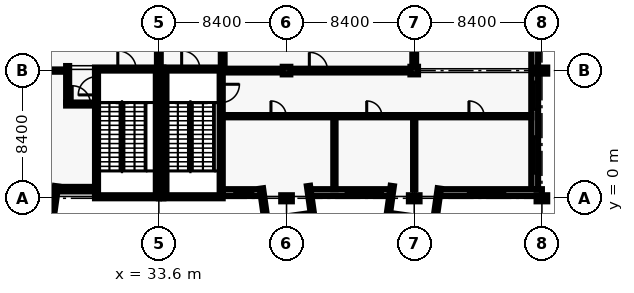
"""IFC4 building model, lengths in metres.
Left out: names, types, materials, properties, quantities, classifications, styles, units other than length and angle.
Written with IfcOpenShell. Run it as: python <this file> out.ifc"""

import sys

from ifc_helpers import new_model, si_unit, direction, frame, frame_2d, origin, origin_2d, place, context, subcontext, project, spatial, rectangle, extrude, element, fill, save


model = new_model("IFC4")
c1 = context("Model", 3, precision=1e-05, world=origin(), true_north=direction((0.0, 1.0)))
c2 = subcontext(c1, "Body", "Model", "MODEL_VIEW")
j1 = project(units=[si_unit("LENGTHUNIT", "METRE"), si_unit("PLANEANGLEUNIT", "RADIAN")], contexts=[c1])
p1 = place(None, origin())
s1 = spatial("IfcSite", under=j1, at=p1, CompositionType="ELEMENT")
p2 = place(p1, origin())
s2 = spatial("IfcBuilding", under=s1, at=p2, CompositionType="ELEMENT")
p3 = place(p2, frame((0.0, 0.0, 10.2)))
s3 = spatial("IfcBuildingStorey", under=s2, at=p3, CompositionType="ELEMENT", Elevation=10.2)
p4 = place(p3, frame((33.6, 0.1, 0.0), z_axis=(0.0, 0.0, 1.0), x_axis=(-1.0, 0.0, 0.0)))
e1 = element("IfcWall", 1, at=p4, inside=s3, PredefinedType="SHEAR", context=c2, shape_type="SweptSolid", body=[
    extrude(rectangle(XDim=4.2, YDim=0.2, at=frame_2d((2.1, 0.0))), origin(), (0.0, 0.0, 1.0), 4.8),
])
p5 = place(p3, frame((29.4, 8.5, 0.0), z_axis=(0.0, 0.0, 1.0), x_axis=(1.0, 0.0, 0.0)))
e2 = element("IfcWall", 2, at=p5, inside=s3, PredefinedType="SHEAR", context=c2, shape_type="SweptSolid", body=[
    extrude(rectangle(XDim=4.2, YDim=0.2, at=frame_2d((2.1, 0.0))), origin(), (0.0, 0.0, 1.0), 4.8),
])
p6 = place(p5, frame((1.5, 0.0, 0.0)))
e3 = element("IfcOpeningElement", 3, at=p6, cuts=e2, PredefinedType="OPENING", context=c2, shape_type="SweptSolid", body=[
    extrude(rectangle(XDim=1.2, YDim=2.1, at=frame_2d((0.6, 1.05))), frame((0.0, 0.11, 0.0), z_axis=(0.0, -1.0, 0.0), x_axis=(1.0, 0.0, 0.0)), (0.0, 0.0, 1.0), 0.22),
])
p7 = place(p3, frame((29.5, 0.2, 0.0), z_axis=(0.0, 0.0, 1.0), x_axis=(0.0, 1.0, 0.0)))
e4 = element("IfcWall", 4, at=p7, inside=s3, PredefinedType="SHEAR", context=c2, shape_type="SweptSolid", body=[
    extrude(rectangle(XDim=8.2, YDim=0.2, at=frame_2d((4.1, 0.0))), origin(), (0.0, 0.0, 1.0), 4.8),
])
p8 = place(p7, frame((6.6, 0.0, 0.0)))
e5 = element("IfcOpeningElement", 5, at=p8, cuts=e4, PredefinedType="OPENING", context=c2, shape_type="SweptSolid", body=[
    extrude(rectangle(XDim=1.2, YDim=2.1, at=frame_2d((0.6, 1.05))), frame((0.0, 0.11, 0.0), z_axis=(0.0, -1.0, 0.0), x_axis=(1.0, 0.0, 0.0)), (0.0, 0.0, 1.0), 0.22),
])
p9 = place(p3, frame((33.5, 8.4, 0.0), z_axis=(0.0, 0.0, 1.0), x_axis=(0.0, -1.0, 0.0)))
e6 = element("IfcWall", 6, at=p9, inside=s3, PredefinedType="SHEAR", context=c2, shape_type="SweptSolid", body=[
    extrude(rectangle(XDim=8.2, YDim=0.2, at=frame_2d((4.1, 0.0))), origin(), (0.0, 0.0, 1.0), 4.8),
])
p10 = place(p3, frame((37.8, 0.1, 0.0), z_axis=(0.0, 0.0, 1.0), x_axis=(-1.0, 0.0, 0.0)))
e7 = element("IfcWall", 7, at=p10, inside=s3, PredefinedType="SHEAR", context=c2, shape_type="SweptSolid", body=[
    extrude(rectangle(XDim=3.9, YDim=0.2, at=frame_2d((1.95, 0.0))), origin(), (0.0, 0.0, 1.0), 4.8),
])
p11 = place(p3, frame((33.9, 8.5, 0.0), z_axis=(0.0, 0.0, 1.0), x_axis=(1.0, 0.0, 0.0)))
e8 = element("IfcWall", 8, at=p11, inside=s3, PredefinedType="SHEAR", context=c2, shape_type="SweptSolid", body=[
    extrude(rectangle(XDim=3.9, YDim=0.2, at=frame_2d((1.95, 0.0))), origin(), (0.0, 0.0, 1.0), 4.8),
])
p12 = place(p11, frame((1.2, 0.0, 0.0)))
e9 = element("IfcOpeningElement", 9, at=p12, cuts=e8, PredefinedType="OPENING", context=c2, shape_type="SweptSolid", body=[
    extrude(rectangle(XDim=1.2, YDim=2.1, at=frame_2d((0.6, 1.05))), frame((0.0, 0.11, 0.0), z_axis=(0.0, -1.0, 0.0), x_axis=(1.0, 0.0, 0.0)), (0.0, 0.0, 1.0), 0.22),
])
p13 = place(p3, frame((34.0, 0.2, 0.0), z_axis=(0.0, 0.0, 1.0), x_axis=(0.0, 1.0, 0.0)))
e10 = element("IfcWall", 10, at=p13, inside=s3, PredefinedType="SHEAR", context=c2, shape_type="SweptSolid", body=[
    extrude(rectangle(XDim=8.2, YDim=0.2, at=frame_2d((4.1, 0.0))), origin(), (0.0, 0.0, 1.0), 4.8),
])
p14 = place(p3, frame((37.7, 8.4, 0.0), z_axis=(0.0, 0.0, 1.0), x_axis=(0.0, -1.0, 0.0)))
e11 = element("IfcWall", 11, at=p14, inside=s3, PredefinedType="SHEAR", context=c2, shape_type="SweptSolid", body=[
    extrude(rectangle(XDim=8.2, YDim=0.2, at=frame_2d((4.1, 0.0))), origin(), (0.0, 0.0, 1.0), 4.8),
])
p15 = place(p14, frame((0.9, 0.0, 0.0)))
e12 = element("IfcOpeningElement", 12, at=p15, cuts=e11, PredefinedType="OPENING", context=c2, shape_type="SweptSolid", body=[
    extrude(rectangle(XDim=1.2, YDim=2.1, at=frame_2d((0.6, 1.05))), frame((0.0, 0.11, 0.0), z_axis=(0.0, -1.0, 0.0), x_axis=(1.0, 0.0, 0.0)), (0.0, 0.0, 1.0), 0.22),
])
p16 = place(p3, frame((42.0, 0.0, 0.0), z_axis=(0.0, 0.0, 1.0), x_axis=(1.0, 0.0, 0.0)))
e13 = element("IfcColumn", 13, at=p16, inside=s3, PredefinedType="COLUMN", context=c2, shape_type="SweptSolid", body=[
    extrude(rectangle(XDim=0.7, YDim=0.4, at=origin_2d()), origin(), (0.0, 0.0, 1.0), 4.8),
])
p17 = place(p3, frame((42.0, 8.4, 0.0), z_axis=(0.0, 0.0, 1.0), x_axis=(1.0, 0.0, 0.0)))
e14 = element("IfcColumn", 14, at=p17, inside=s3, PredefinedType="COLUMN", context=c2, shape_type="SweptSolid", body=[
    extrude(rectangle(XDim=0.5, YDim=0.5, at=origin_2d()), origin(), (0.0, 0.0, 1.0), 4.8),
])
p18 = place(p3, frame((50.4, 0.0, 0.0), z_axis=(0.0, 0.0, 1.0), x_axis=(1.0, 0.0, 0.0)))
e15 = element("IfcColumn", 15, at=p18, inside=s3, PredefinedType="COLUMN", context=c2, shape_type="SweptSolid", body=[
    extrude(rectangle(XDim=0.7, YDim=0.4, at=origin_2d()), origin(), (0.0, 0.0, 1.0), 4.8),
])
p19 = place(p3, frame((50.4, 8.4, 0.0), z_axis=(0.0, 0.0, 1.0), x_axis=(1.0, 0.0, 0.0)))
e16 = element("IfcColumn", 16, at=p19, inside=s3, PredefinedType="COLUMN", context=c2, shape_type="SweptSolid", body=[
    extrude(rectangle(XDim=0.5, YDim=0.5, at=origin_2d()), origin(), (0.0, 0.0, 1.0), 4.8),
])
for number, where, z_axis, x_axis in (
    (17, (58.8, 0.0, 0.0), (0.0, 0.0, 1.0), (1.0, 0.0, 0.0)),
    (18, (58.8, 8.4, 0.0), (0.0, 0.0, 1.0), (0.0, 1.0, 0.0)),
):
    element("IfcColumn", number, at=place(p3, frame(where, z_axis=z_axis, x_axis=x_axis)), inside=s3, PredefinedType="COLUMN", context=c2, shape_type="SweptSolid", body=[
        extrude(rectangle(XDim=0.7, YDim=0.4, at=origin_2d()), origin(), (0.0, 0.0, 1.0), 4.8),
    ])
for number, where, z_axis, x_axis in (
    (19, (33.9, 0.1, 0.0), (0.0, 0.0, 1.0), (-1.0, 0.0, 0.0)),
    (20, (33.6, 8.5, 0.0), (0.0, 0.0, 1.0), (1.0, 0.0, 0.0)),
):
    element("IfcWall", number, at=place(p3, frame(where, z_axis=z_axis, x_axis=x_axis)), inside=s3, PredefinedType="SHEAR", context=c2, shape_type="SweptSolid", body=[
        extrude(rectangle(XDim=0.3, YDim=0.2, at=frame_2d((0.15, 0.0))), origin(), (0.0, 0.0, 1.0), 4.8),
    ])
p20 = place(p3, frame((26.869, 0.795, 0.0), z_axis=(0.0, 0.0, 1.0), x_axis=(-0.139141913905, -0.990272451295, 0.0)))
e21 = element("IfcWall", 21, at=p20, inside=s3, PredefinedType="SOLIDWALL", context=c2, shape_type="SweptSolid", body=[
    extrude(rectangle(XDim=2.219, YDim=0.215, at=frame_2d((1.11, 0.0))), origin(), (0.0, 0.0, 1.0), 4.5),
])
p21 = place(p3, frame((29.4, 0.6, 0.0), z_axis=(0.0, 0.0, 1.0), x_axis=(-1.0, 0.0, 0.0)))
e22 = element("IfcWall", 22, at=p21, inside=s3, PredefinedType="SOLIDWALL", context=c2, shape_type="SweptSolid", body=[
    extrude(rectangle(XDim=2.449, YDim=0.3, at=frame_2d((1.225, 0.0))), origin(), (0.0, 0.0, 1.0), 4.5),
])
p22 = place(p21, frame((0.775, 0.0, 0.9)))
e23 = element("IfcOpeningElement", 23, at=p22, cuts=e22, PredefinedType="OPENING", context=c2, shape_type="SweptSolid", body=[
    extrude(rectangle(XDim=1.2, YDim=1.5, at=frame_2d((0.6, 0.75))), frame((0.0, 0.16, 0.0), z_axis=(0.0, -1.0, 0.0), x_axis=(1.0, 0.0, 0.0)), (0.0, 0.0, 1.0), 0.32),
])
p23 = place(p3, frame((58.325, 15.6, 0.0), z_axis=(0.0, 0.0, 1.0), x_axis=(0.0, -1.0, 0.0)))
e24 = element("IfcWall", 24, at=p23, inside=s3, PredefinedType="SOLIDWALL", context=c2, shape_type="SweptSolid", body=[
    extrude(rectangle(XDim=15.0, YDim=0.45, at=frame_2d((7.5, 0.0))), origin(), (0.0, 0.0, 1.0), 4.5),
])
p24 = place(p23, frame((11.55, 0.0, 0.9)))
e25 = element("IfcOpeningElement", 25, at=p24, cuts=e24, PredefinedType="OPENING", context=c2, shape_type="SweptSolid", body=[
    extrude(rectangle(XDim=2.4, YDim=1.5, at=frame_2d((1.2, 0.75))), frame((0.0, 0.235, 0.0), z_axis=(0.0, -1.0, 0.0), x_axis=(1.0, 0.0, 0.0)), (0.0, 0.0, 1.0), 0.47),
])
p25 = place(p23, frame((7.95, 0.0, 0.9)))
e26 = element("IfcOpeningElement", 26, at=p25, cuts=e24, PredefinedType="OPENING", context=c2, shape_type="SweptSolid", body=[
    extrude(rectangle(XDim=1.8, YDim=1.5, at=frame_2d((0.9, 0.75))), frame((0.0, 0.235, 0.0), z_axis=(0.0, -1.0, 0.0), x_axis=(1.0, 0.0, 0.0)), (0.0, 0.0, 1.0), 0.47),
])
p26 = place(p23, frame((2.25, 0.0, 0.9)))
e27 = element("IfcOpeningElement", 27, at=p26, cuts=e24, PredefinedType="OPENING", context=c2, shape_type="SweptSolid", body=[
    extrude(rectangle(XDim=2.4, YDim=1.5, at=frame_2d((1.2, 0.75))), frame((0.0, 0.235, 0.0), z_axis=(0.0, -1.0, 0.0), x_axis=(1.0, 0.0, 0.0)), (0.0, 0.0, 1.0), 0.47),
])
p27 = place(p3, frame((40.352, 0.645, 0.0), z_axis=(0.0, 0.0, 1.0), x_axis=(0.139057680951, -0.990284283107, 0.0)))
e28 = element("IfcWall", 28, at=p27, inside=s3, PredefinedType="SOLIDWALL", context=c2, shape_type="SweptSolid", body=[
    extrude(rectangle(XDim=2.068, YDim=0.215, at=frame_2d((1.034, 0.0))), origin(), (0.0, 0.0, 1.0), 4.5),
])
for number, where, z_axis, x_axis in (
    (29, (43.444, 0.809, 0.0), (0.0, 0.0, 1.0), (0.139, -0.99, 0.0)),
    (30, (48.956, 0.809, 0.0), (0.0, 0.0, 1.0), (-0.139, -0.99, 0.0)),
):
    element("IfcWall", number, at=place(p3, frame(where, z_axis=z_axis, x_axis=x_axis)), inside=s3, PredefinedType="SOLIDWALL", context=c2, shape_type="SweptSolid", body=[
        extrude(rectangle(XDim=1.8, YDim=0.215, at=frame_2d((0.9, 0.0))), origin(), (0.0, 0.0, 1.0), 4.5),
    ])
p28 = place(p3, frame((52.048, 0.645, 0.0), z_axis=(0.0, 0.0, 1.0), x_axis=(-0.139173441018, -0.990268020949, 0.0)))
e31 = element("IfcWall", 31, at=p28, inside=s3, PredefinedType="SOLIDWALL", context=c2, shape_type="SweptSolid", body=[
    extrude(rectangle(XDim=2.068, YDim=0.215, at=frame_2d((1.034, 0.0))), origin(), (0.0, 0.0, 1.0), 4.5),
])
p29 = place(p3, frame((40.281, 0.375, 0.0), z_axis=(0.0, 0.0, 1.0), x_axis=(-1.0, 0.0, 0.0)))
e32 = element("IfcWall", 32, at=p29, inside=s3, PredefinedType="SOLIDWALL", context=c2, shape_type="SweptSolid", body=[
    extrude(rectangle(XDim=2.481, YDim=0.45, at=frame_2d((1.24, 0.0))), origin(), (0.0, 0.0, 1.0), 4.5),
])
p30 = place(p29, frame((0.49, 0.0, 0.9)))
e33 = element("IfcOpeningElement", 33, at=p30, cuts=e32, PredefinedType="OPENING", context=c2, shape_type="SweptSolid", body=[
    extrude(rectangle(XDim=1.2, YDim=1.5, at=frame_2d((0.6, 0.75))), frame((0.0, 0.235, 0.0), z_axis=(0.0, -1.0, 0.0), x_axis=(1.0, 0.0, 0.0)), (0.0, 0.0, 1.0), 0.47),
])
p31 = place(p3, frame((48.787, 0.375, 0.0), z_axis=(0.0, 0.0, 1.0), x_axis=(-1.0, 0.0, 0.0)))
e34 = element("IfcWall", 34, at=p31, inside=s3, PredefinedType="SOLIDWALL", context=c2, shape_type="SweptSolid", body=[
    extrude(rectangle(XDim=5.173, YDim=0.45, at=frame_2d((2.586, 0.0))), origin(), (0.0, 0.0, 1.0), 4.5),
])
p32 = place(p31, frame((0.468, 0.0, 0.9)))
e35 = element("IfcOpeningElement", 35, at=p32, cuts=e34, PredefinedType="OPENING", context=c2, shape_type="SweptSolid", body=[
    extrude(rectangle(XDim=2.4, YDim=1.5, at=frame_2d((1.2, 0.75))), frame((0.0, 0.235, 0.0), z_axis=(0.0, -1.0, 0.0), x_axis=(1.0, 0.0, 0.0)), (0.0, 0.0, 1.0), 0.47),
])
p33 = place(p3, frame((58.8, 0.375, 0.0), z_axis=(0.0, 0.0, 1.0), x_axis=(-1.0, 0.0, 0.0)))
e36 = element("IfcWall", 36, at=p33, inside=s3, PredefinedType="SOLIDWALL", context=c2, shape_type="SweptSolid", body=[
    extrude(rectangle(XDim=6.681, YDim=0.45, at=frame_2d((3.341, 0.0))), origin(), (0.0, 0.0, 1.0), 4.5),
])
p34 = place(p33, frame((2.441, 0.0, 0.9)))
e37 = element("IfcOpeningElement", 37, at=p34, cuts=e36, PredefinedType="OPENING", context=c2, shape_type="SweptSolid", body=[
    extrude(rectangle(XDim=2.4, YDim=1.5, at=frame_2d((1.2, 0.75))), frame((0.0, 0.235, 0.0), z_axis=(0.0, -1.0, 0.0), x_axis=(1.0, 0.0, 0.0)), (0.0, 0.0, 1.0), 0.47),
])
p35 = place(p3, frame((37.675, 8.4, 0.0), z_axis=(0.0, 0.0, 1.0), x_axis=(1.0, 0.0, 0.0)))
e38 = element("IfcWall", 38, at=p35, inside=s3, PredefinedType="PARTITIONING", context=c2, shape_type="SweptSolid", body=[
    extrude(rectangle(XDim=12.85, YDim=0.25, at=frame_2d((6.425, 0.0))), origin(), (0.0, 0.0, 1.0), 3.8),
])
p36 = place(p35, frame((5.825, 0.0, 0.0)))
e39 = element("IfcOpeningElement", 39, at=p36, cuts=e38, PredefinedType="OPENING", context=c2, shape_type="SweptSolid", body=[
    extrude(rectangle(XDim=1.2, YDim=2.1, at=frame_2d((0.6, 1.05))), frame((0.0, 0.135, 0.0), z_axis=(0.0, -1.0, 0.0), x_axis=(1.0, 0.0, 0.0)), (0.0, 0.0, 1.0), 0.27),
])
p37 = place(p3, frame((33.6, 8.6, 0.0), z_axis=(0.0, 0.0, 1.0), x_axis=(0.0, 1.0, 0.0)))
e40 = element("IfcWall", 40, at=p37, inside=s3, PredefinedType="SOLIDWALL", context=c2, shape_type="SweptSolid", body=[
    extrude(rectangle(XDim=15.85, YDim=0.25, at=frame_2d((7.925, 0.0))), origin(), (0.0, 0.0, 1.0), 3.8),
])
p38 = place(p3, frame((37.8, 8.525, 0.0), z_axis=(0.0, 0.0, 1.0), x_axis=(0.0, 1.0, 0.0)))
e41 = element("IfcWall", 41, at=p38, inside=s3, PredefinedType="PARTITIONING", context=c2, shape_type="SweptSolid", body=[
    extrude(rectangle(XDim=16.675, YDim=0.25, at=frame_2d((8.337, 0.0))), origin(), (0.0, 0.0, 1.0), 3.8),
])
p39 = place(p3, frame((50.4, 8.525, 0.0), z_axis=(0.0, 0.0, 1.0), x_axis=(0.0, 1.0, 0.0)))
e42 = element("IfcWall", 42, at=p39, inside=s3, PredefinedType="PARTITIONING", context=c2, shape_type="SweptSolid", body=[
    extrude(rectangle(XDim=9.8, YDim=0.25, at=frame_2d((4.9, 0.0))), origin(), (0.0, 0.0, 1.0), 3.8),
])
p40 = place(p3, frame((27.5, 6.2, 0.0), z_axis=(0.0, 0.0, 1.0), x_axis=(1.0, 0.0, 0.0)))
e43 = element("IfcWall", 43, at=p40, inside=s3, PredefinedType="SOLIDWALL", context=c2, shape_type="SweptSolid", body=[
    extrude(rectangle(XDim=1.9, YDim=0.2, at=frame_2d((0.95, 0.0))), origin(), (0.0, 0.0, 1.0), 4.5),
])
p41 = place(p40, frame((0.4, 0.0, 0.0)))
e44 = element("IfcOpeningElement", 44, at=p41, cuts=e43, PredefinedType="OPENING", context=c2, shape_type="SweptSolid", body=[
    extrude(rectangle(XDim=1.2, YDim=2.1, at=frame_2d((0.6, 1.05))), frame((0.0, 0.11, 0.0), z_axis=(0.0, -1.0, 0.0), x_axis=(1.0, 0.0, 0.0)), (0.0, 0.0, 1.0), 0.22),
])
p42 = place(p3, frame((27.6, 6.3, 0.0), z_axis=(0.0, 0.0, 1.0), x_axis=(0.0, 1.0, 0.0)))
e45 = element("IfcWall", 45, at=p42, inside=s3, PredefinedType="SOLIDWALL", context=c2, shape_type="SweptSolid", body=[
    extrude(rectangle(XDim=2.4, YDim=0.2, at=frame_2d((1.2, 0.0))), origin(), (0.0, 0.0, 1.0), 4.0),
])
p43 = place(p3, frame((37.8, 5.4, 0.0), z_axis=(0.0, 0.0, 1.0), x_axis=(1.0, 0.0, 0.0)))
e46 = element("IfcWall", 46, at=p43, inside=s3, PredefinedType="PARTITIONING", context=c2, shape_type="SweptSolid", body=[
    extrude(rectangle(XDim=20.3, YDim=0.15, at=frame_2d((10.15, 0.0))), origin(), (0.0, 0.0, 1.0), 3.8),
])
p44 = place(p43, frame((3.175, 0.0, 0.0)))
e47 = element("IfcOpeningElement", 47, at=p44, cuts=e46, PredefinedType="OPENING", context=c2, shape_type="SweptSolid", body=[
    extrude(rectangle(XDim=1.0, YDim=2.1, at=frame_2d((0.5, 1.05))), frame((0.0, 0.085, 0.0), z_axis=(0.0, -1.0, 0.0), x_axis=(1.0, 0.0, 0.0)), (0.0, 0.0, 1.0), 0.17),
])
p45 = place(p43, frame((9.475, 0.0, 0.0)))
e48 = element("IfcOpeningElement", 48, at=p45, cuts=e46, PredefinedType="OPENING", context=c2, shape_type="SweptSolid", body=[
    extrude(rectangle(XDim=1.0, YDim=2.1, at=frame_2d((0.5, 1.05))), frame((0.0, 0.085, 0.0), z_axis=(0.0, -1.0, 0.0), x_axis=(1.0, 0.0, 0.0)), (0.0, 0.0, 1.0), 0.17),
])
p46 = place(p43, frame((16.2, 0.0, 0.0)))
e49 = element("IfcOpeningElement", 49, at=p46, cuts=e46, PredefinedType="OPENING", context=c2, shape_type="SweptSolid", body=[
    extrude(rectangle(XDim=1.0, YDim=2.1, at=frame_2d((0.5, 1.05))), frame((0.0, 0.085, 0.0), z_axis=(0.0, -1.0, 0.0), x_axis=(1.0, 0.0, 0.0)), (0.0, 0.0, 1.0), 0.17),
])
p47 = place(p3, frame((25.125, 8.4, 0.0), z_axis=(0.0, 0.0, 1.0), x_axis=(1.0, 0.0, 0.0)))
e50 = element("IfcWall", 50, at=p47, inside=s3, PredefinedType="PARTITIONING", context=c2, shape_type="SweptSolid", body=[
    extrude(rectangle(XDim=2.375, YDim=0.15, at=frame_2d((1.188, 0.0))), origin(), (0.0, 0.0, 1.0), 3.8),
])
p48 = place(p3, frame((45.15, 0.6, 0.0), z_axis=(0.0, 0.0, 1.0), x_axis=(0.0, 1.0, 0.0)))
e51 = element("IfcWall", 51, at=p48, inside=s3, PredefinedType="PARTITIONING", context=c2, shape_type="SweptSolid", body=[
    extrude(rectangle(XDim=4.725, YDim=0.15, at=frame_2d((2.362, 0.0))), origin(), (0.0, 0.0, 1.0), 4.5),
])
p49 = place(p3, frame((50.4, 0.6, 0.0), z_axis=(0.0, 0.0, 1.0), x_axis=(0.0, 1.0, 0.0)))
e52 = element("IfcWall", 52, at=p49, inside=s3, PredefinedType="PARTITIONING", context=c2, shape_type="SweptSolid", body=[
    extrude(rectangle(XDim=4.725, YDim=0.15, at=frame_2d((2.362, 0.0))), origin(), (0.0, 0.0, 1.0), 3.8),
])
p50 = place(p22, origin())
e53 = element("IfcWindow", 53, at=p50, inside=s3, PartitioningType="SINGLE_PANEL", PredefinedType="WINDOW", context=c2, shape_type="SweptSolid", body=[
    extrude(rectangle(XDim=1.2, YDim=1.5, at=frame_2d((0.6, 0.75))), frame((0.0, 0.03, 0.0), z_axis=(0.0, -1.0, 0.0), x_axis=(1.0, 0.0, 0.0)), (0.0, 0.0, 1.0), 0.06),
])
fill(e23, e53)
p51 = place(p24, origin())
e54 = element("IfcWindow", 54, at=p51, inside=s3, PartitioningType="SINGLE_PANEL", PredefinedType="WINDOW", context=c2, shape_type="SweptSolid", body=[
    extrude(rectangle(XDim=2.4, YDim=1.5, at=frame_2d((1.2, 0.75))), frame((0.0, 0.03, 0.0), z_axis=(0.0, -1.0, 0.0), x_axis=(1.0, 0.0, 0.0)), (0.0, 0.0, 1.0), 0.06),
])
fill(e25, e54)
p52 = place(p25, origin())
e55 = element("IfcWindow", 55, at=p52, inside=s3, PartitioningType="SINGLE_PANEL", PredefinedType="WINDOW", context=c2, shape_type="SweptSolid", body=[
    extrude(rectangle(XDim=1.8, YDim=1.5, at=frame_2d((0.9, 0.75))), frame((0.0, 0.03, 0.0), z_axis=(0.0, -1.0, 0.0), x_axis=(1.0, 0.0, 0.0)), (0.0, 0.0, 1.0), 0.06),
])
fill(e26, e55)
p53 = place(p30, origin())
e56 = element("IfcWindow", 56, at=p53, inside=s3, PartitioningType="SINGLE_PANEL", PredefinedType="WINDOW", context=c2, shape_type="SweptSolid", body=[
    extrude(rectangle(XDim=1.2, YDim=1.5, at=frame_2d((0.6, 0.75))), frame((0.0, 0.03, 0.0), z_axis=(0.0, -1.0, 0.0), x_axis=(1.0, 0.0, 0.0)), (0.0, 0.0, 1.0), 0.06),
])
fill(e33, e56)
p54 = place(p32, origin())
e57 = element("IfcWindow", 57, at=p54, inside=s3, PartitioningType="SINGLE_PANEL", PredefinedType="WINDOW", context=c2, shape_type="SweptSolid", body=[
    extrude(rectangle(XDim=2.4, YDim=1.5, at=frame_2d((1.2, 0.75))), frame((0.0, 0.03, 0.0), z_axis=(0.0, -1.0, 0.0), x_axis=(1.0, 0.0, 0.0)), (0.0, 0.0, 1.0), 0.06),
])
fill(e35, e57)
p55 = place(p34, origin())
e58 = element("IfcWindow", 58, at=p55, inside=s3, PartitioningType="SINGLE_PANEL", PredefinedType="WINDOW", context=c2, shape_type="SweptSolid", body=[
    extrude(rectangle(XDim=2.4, YDim=1.5, at=frame_2d((1.2, 0.75))), frame((0.0, 0.03, 0.0), z_axis=(0.0, -1.0, 0.0), x_axis=(1.0, 0.0, 0.0)), (0.0, 0.0, 1.0), 0.06),
])
fill(e37, e58)
p56 = place(p8, origin())
e59 = element("IfcDoor", 59, at=p56, inside=s3, OperationType="SINGLE_SWING_RIGHT", PredefinedType="DOOR", context=c2, shape_type="SweptSolid", body=[
    extrude(rectangle(XDim=1.2, YDim=2.1, at=frame_2d((0.6, 1.05))), frame((0.0, 0.025, 0.0), z_axis=(0.0, -1.0, 0.0), x_axis=(1.0, 0.0, 0.0)), (0.0, 0.0, 1.0), 0.05),
])
fill(e5, e59)
p57 = place(p6, origin())
e60 = element("IfcDoor", 60, at=p57, inside=s3, OperationType="SINGLE_SWING_RIGHT", PredefinedType="DOOR", context=c2, shape_type="SweptSolid", body=[
    extrude(rectangle(XDim=1.2, YDim=2.1, at=frame_2d((0.6, 1.05))), frame((0.0, 0.025, 0.0), z_axis=(0.0, -1.0, 0.0), x_axis=(1.0, 0.0, 0.0)), (0.0, 0.0, 1.0), 0.05),
])
fill(e3, e60)
p58 = place(p15, origin())
e61 = element("IfcDoor", 61, at=p58, inside=s3, OperationType="SINGLE_SWING_RIGHT", PredefinedType="DOOR", context=c2, shape_type="SweptSolid", body=[
    extrude(rectangle(XDim=1.2, YDim=2.1, at=frame_2d((0.6, 1.05))), frame((0.0, 0.025, 0.0), z_axis=(0.0, -1.0, 0.0), x_axis=(1.0, 0.0, 0.0)), (0.0, 0.0, 1.0), 0.05),
])
fill(e12, e61)
p59 = place(p12, origin())
e62 = element("IfcDoor", 62, at=p59, inside=s3, OperationType="SINGLE_SWING_RIGHT", PredefinedType="DOOR", context=c2, shape_type="SweptSolid", body=[
    extrude(rectangle(XDim=1.2, YDim=2.1, at=frame_2d((0.6, 1.05))), frame((0.0, 0.025, 0.0), z_axis=(0.0, -1.0, 0.0), x_axis=(1.0, 0.0, 0.0)), (0.0, 0.0, 1.0), 0.05),
])
fill(e9, e62)
p60 = place(p41, origin())
e63 = element("IfcDoor", 63, at=p60, inside=s3, OperationType="SINGLE_SWING_RIGHT", PredefinedType="DOOR", context=c2, shape_type="SweptSolid", body=[
    extrude(rectangle(XDim=1.2, YDim=2.1, at=frame_2d((0.6, 1.05))), frame((0.0, 0.025, 0.0), z_axis=(0.0, -1.0, 0.0), x_axis=(1.0, 0.0, 0.0)), (0.0, 0.0, 1.0), 0.05),
])
fill(e44, e63)
p61 = place(p44, origin())
e64 = element("IfcDoor", 64, at=p61, inside=s3, OperationType="SINGLE_SWING_LEFT", PredefinedType="DOOR", context=c2, shape_type="SweptSolid", body=[
    extrude(rectangle(XDim=1.0, YDim=2.1, at=frame_2d((0.5, 1.05))), frame((0.0, 0.025, 0.0), z_axis=(0.0, -1.0, 0.0), x_axis=(1.0, 0.0, 0.0)), (0.0, 0.0, 1.0), 0.05),
])
fill(e47, e64)
p62 = place(p45, origin())
e65 = element("IfcDoor", 65, at=p62, inside=s3, OperationType="SINGLE_SWING_RIGHT", PredefinedType="DOOR", context=c2, shape_type="SweptSolid", body=[
    extrude(rectangle(XDim=1.0, YDim=2.1, at=frame_2d((0.5, 1.05))), frame((0.0, 0.025, 0.0), z_axis=(0.0, -1.0, 0.0), x_axis=(1.0, 0.0, 0.0)), (0.0, 0.0, 1.0), 0.05),
])
fill(e48, e65)
p63 = place(p46, origin())
e66 = element("IfcDoor", 66, at=p63, inside=s3, OperationType="SINGLE_SWING_RIGHT", PredefinedType="DOOR", context=c2, shape_type="SweptSolid", body=[
    extrude(rectangle(XDim=1.0, YDim=2.1, at=frame_2d((0.5, 1.05))), frame((0.0, 0.025, 0.0), z_axis=(0.0, -1.0, 0.0), x_axis=(1.0, 0.0, 0.0)), (0.0, 0.0, 1.0), 0.05),
])
fill(e49, e66)
p64 = place(p36, origin())
e67 = element("IfcDoor", 67, at=p64, inside=s3, OperationType="SINGLE_SWING_LEFT", PredefinedType="DOOR", context=c2, shape_type="SweptSolid", body=[
    extrude(rectangle(XDim=1.2, YDim=2.1, at=frame_2d((0.6, 1.05))), frame((0.0, 0.025, 0.0), z_axis=(0.0, -1.0, 0.0), x_axis=(1.0, 0.0, 0.0)), (0.0, 0.0, 1.0), 0.05),
])
fill(e39, e67)
save(model, sys.argv[1])
